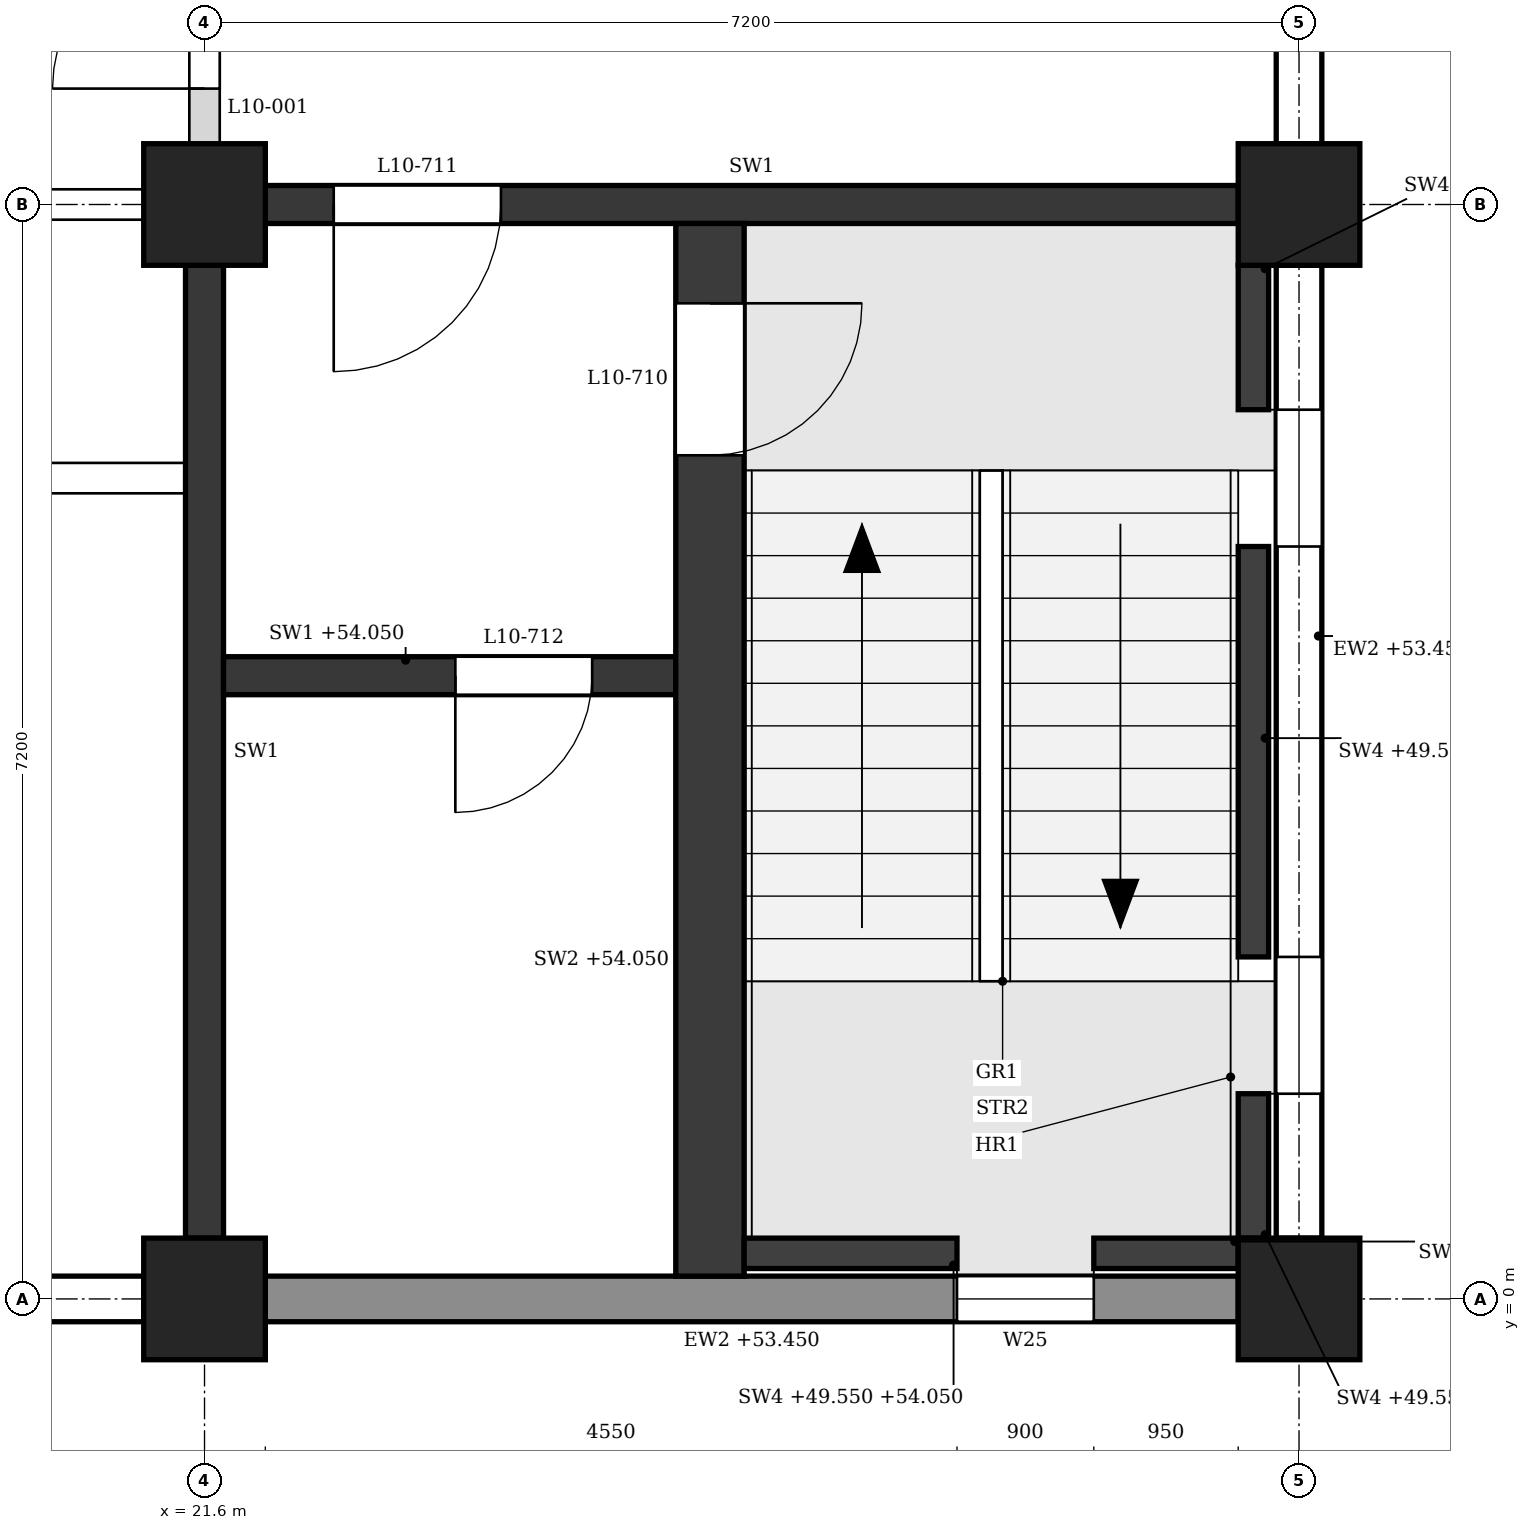
"""IFC4 building model, lengths in metres.
Left out: names, types, materials, properties, quantities, classifications, styles, units other than length and angle.
Written with IfcOpenShell. Run it as: python <this file> out.ifc"""

import sys

from ifc_helpers import new_model, si_unit, direction, frame, frame_2d, origin, origin_2d, place, context, subcontext, project, spatial, polyline, rectangle, outline, extrude, element, fill, save


model = new_model("IFC4")
c1 = context("Model", 3, precision=1e-05, world=origin(), true_north=direction((0.0, 1.0)))
c2 = subcontext(c1, "Body", "Model", "MODEL_VIEW")
j1 = project(units=[si_unit("LENGTHUNIT", "METRE"), si_unit("PLANEANGLEUNIT", "RADIAN")], contexts=[c1])
p1 = place(None, origin())
s1 = spatial("IfcSite", under=j1, at=p1, CompositionType="ELEMENT")
p2 = place(p1, origin())
s2 = spatial("IfcBuilding", under=s1, at=p2, CompositionType="ELEMENT")
p3 = place(p2, frame((0.0, 0.0, 49.8)))
s3 = spatial("IfcBuildingStorey", under=s2, at=p3, CompositionType="ELEMENT", Elevation=49.8)
for number, where, z_axis, x_axis in (
    (1, (21.6, 0.0, 0.0), (0.0, 0.0, 1.0), (1.0, 0.0, 0.0)),
    (2, (21.6, 7.2, 0.0), (0.0, 0.0, 1.0), (1.0, 0.0, 0.0)),
    (3, (28.8, 0.0, 0.0), (0.0, 0.0, 1.0), (1.0, 0.0, 0.0)),
    (4, (28.8, 7.2, 0.0), (0.0, 0.0, 1.0), (1.0, 0.0, 0.0)),
):
    element("IfcColumn", number, at=place(p3, frame(where, z_axis=z_axis, x_axis=x_axis)), inside=s3, PredefinedType="COLUMN", context=c2, shape_type="SweptSolid", body=[
        extrude(rectangle(XDim=0.8, YDim=0.8, at=origin_2d()), origin(), (0.0, 0.0, 1.0), 4.5),
    ])
p4 = place(p3, frame((14.8, 0.0, 0.0), z_axis=(0.0, 0.0, 1.0), x_axis=(1.0, 0.0, 0.0)))
e5 = element("IfcWall", 5, at=p4, inside=s3, PredefinedType="STANDARD", context=c2, shape_type="SweptSolid", body=[
    extrude(rectangle(XDim=6.4, YDim=0.3, at=frame_2d((3.2, 0.0))), origin(), (0.0, 0.0, 1.0), 3.65),
])
p5 = place(p4, frame((0.65, 0.0, 0.9)))
e6 = element("IfcOpeningElement", 6, at=p5, cuts=e5, PredefinedType="OPENING", context=c2, shape_type="SweptSolid", body=[
    extrude(outline(polyline([(0.0, 0.0), (1.5, 0.0), (1.5, 1.85), (0.75, 2.6), (0.0, 1.85), (0.0, 0.0)])), frame((0.0, 0.16, 0.0), z_axis=(0.0, -1.0, 0.0), x_axis=(1.0, 0.0, 0.0)), (0.0, 0.0, 1.0), 0.32),
])
p6 = place(p4, frame((4.25, 0.0, 0.9)))
e7 = element("IfcOpeningElement", 7, at=p6, cuts=e5, PredefinedType="OPENING", context=c2, shape_type="SweptSolid", body=[
    extrude(outline(polyline([(0.0, 0.0), (1.5, 0.0), (1.5, 1.85), (0.75, 2.6), (0.0, 1.85), (0.0, 0.0)])), frame((0.0, 0.16, 0.0), z_axis=(0.0, -1.0, 0.0), x_axis=(1.0, 0.0, 0.0)), (0.0, 0.0, 1.0), 0.32),
])
p7 = place(p3, frame((22.0, 0.0, 0.0), z_axis=(0.0, 0.0, 1.0), x_axis=(1.0, 0.0, 0.0)))
e8 = element("IfcWall", 8, at=p7, inside=s3, PredefinedType="STANDARD", context=c2, shape_type="SweptSolid", body=[
    extrude(rectangle(XDim=6.4, YDim=0.3, at=frame_2d((3.2, 0.0))), origin(), (0.0, 0.0, 1.0), 3.65),
])
p8 = place(p7, frame((4.55, 0.0, 0.9)))
e9 = element("IfcOpeningElement", 9, at=p8, cuts=e8, PredefinedType="OPENING", context=c2, shape_type="SweptSolid", body=[
    extrude(outline(polyline([(0.0, 0.0), (0.9, 0.0), (0.9, 2.15), (0.45, 2.6), (0.0, 2.15), (0.0, 0.0)])), frame((0.0, 0.16, 0.0), z_axis=(0.0, -1.0, 0.0), x_axis=(1.0, 0.0, 0.0)), (0.0, 0.0, 1.0), 0.32),
])
p9 = place(p3, frame((28.8, 0.4, 0.0), z_axis=(0.0, 0.0, 1.0), x_axis=(0.0, 1.0, 0.0)))
e10 = element("IfcWall", 10, at=p9, inside=s3, PredefinedType="STANDARD", context=c2, shape_type="SweptSolid", body=[
    extrude(rectangle(XDim=6.4, YDim=0.3, at=frame_2d((3.2, 0.0))), origin(), (0.0, 0.0, 1.0), 3.65),
])
p10 = place(p9, frame((0.95, 0.0, 0.9)))
e11 = element("IfcOpeningElement", 11, at=p10, cuts=e10, PredefinedType="OPENING", context=c2, shape_type="SweptSolid", body=[
    extrude(outline(polyline([(0.0, 0.0), (0.9, 0.0), (0.9, 2.15), (0.45, 2.6), (0.0, 2.15), (0.0, 0.0)])), frame((0.0, 0.16, 0.0), z_axis=(0.0, -1.0, 0.0), x_axis=(1.0, 0.0, 0.0)), (0.0, 0.0, 1.0), 0.32),
])
p11 = place(p9, frame((4.55, 0.0, 0.9)))
e12 = element("IfcOpeningElement", 12, at=p11, cuts=e10, PredefinedType="OPENING", context=c2, shape_type="SweptSolid", body=[
    extrude(outline(polyline([(0.0, 0.0), (0.9, 0.0), (0.9, 2.15), (0.45, 2.6), (0.0, 2.15), (0.0, 0.0)])), frame((0.0, 0.16, 0.0), z_axis=(0.0, -1.0, 0.0), x_axis=(1.0, 0.0, 0.0)), (0.0, 0.0, 1.0), 0.32),
])
p12 = place(p3, frame((28.8, 7.6, 0.0), z_axis=(0.0, 0.0, 1.0), x_axis=(0.0, 1.0, 0.0)))
e13 = element("IfcWall", 13, at=p12, inside=s3, PredefinedType="STANDARD", context=c2, shape_type="SweptSolid", body=[
    extrude(rectangle(XDim=6.4, YDim=0.3, at=frame_2d((3.2, 0.0))), origin(), (0.0, 0.0, 1.0), 3.65),
])
p13 = place(p12, frame((0.65, 0.0, 0.9)))
e14 = element("IfcOpeningElement", 14, at=p13, cuts=e13, PredefinedType="OPENING", context=c2, shape_type="SweptSolid", body=[
    extrude(outline(polyline([(0.0, 0.0), (1.5, 0.0), (1.5, 1.85), (0.75, 2.6), (0.0, 1.85), (0.0, 0.0)])), frame((0.0, 0.16, 0.0), z_axis=(0.0, -1.0, 0.0), x_axis=(1.0, 0.0, 0.0)), (0.0, 0.0, 1.0), 0.32),
])
p14 = place(p3, frame((22.0, 7.2, 0.0), z_axis=(0.0, 0.0, 1.0), x_axis=(1.0, 0.0, 0.0)))
e15 = element("IfcWall", 15, at=p14, inside=s3, PredefinedType="SHEAR", context=c2, shape_type="SweptSolid", body=[
    extrude(rectangle(XDim=6.4, YDim=0.25, at=frame_2d((3.2, 0.0))), origin(), (0.0, 0.0, 1.0), 3.55),
])
p15 = place(p14, frame((0.45, 0.0, 0.0)))
e16 = element("IfcOpeningElement", 16, at=p15, cuts=e15, PredefinedType="OPENING", context=c2, shape_type="SweptSolid", body=[
    extrude(rectangle(XDim=1.1, YDim=2.1, at=frame_2d((0.55, 1.05))), frame((0.0, 0.135, 0.0), z_axis=(0.0, -1.0, 0.0), x_axis=(1.0, 0.0, 0.0)), (0.0, 0.0, 1.0), 0.27),
])
p16 = place(p3, frame((21.6, 0.4, 0.0), z_axis=(0.0, 0.0, 1.0), x_axis=(0.0, 1.0, 0.0)))
e17 = element("IfcWall", 17, at=p16, inside=s3, PredefinedType="SHEAR", context=c2, shape_type="SweptSolid", body=[
    extrude(rectangle(XDim=6.4, YDim=0.25, at=frame_2d((3.2, 0.0))), origin(), (0.0, 0.0, 1.0), 3.55),
])
p17 = place(p3, frame((28.5, 0.4, -0.25), z_axis=(0.0, 0.0, 1.0), x_axis=(0.0, 1.0, 0.0)))
e18 = element("IfcWall", 18, at=p17, inside=s3, PredefinedType="SHEAR", context=c2, shape_type="SweptSolid", body=[
    extrude(rectangle(XDim=0.95, YDim=0.2, at=frame_2d((0.475, 0.0))), origin(), (0.0, 0.0, 1.0), 4.5),
])
p18 = place(p3, frame((28.5, 2.25, -0.25), z_axis=(0.0, 0.0, 1.0), x_axis=(0.0, 1.0, 0.0)))
e19 = element("IfcWall", 19, at=p18, inside=s3, PredefinedType="SHEAR", context=c2, shape_type="SweptSolid", body=[
    extrude(rectangle(XDim=2.7, YDim=0.2, at=frame_2d((1.35, 0.0))), origin(), (0.0, 0.0, 1.0), 4.5),
])
p19 = place(p3, frame((28.5, 5.85, -0.25), z_axis=(0.0, 0.0, 1.0), x_axis=(0.0, 1.0, 0.0)))
e20 = element("IfcWall", 20, at=p19, inside=s3, PredefinedType="SHEAR", context=c2, shape_type="SweptSolid", body=[
    extrude(rectangle(XDim=0.95, YDim=0.2, at=frame_2d((0.475, 0.0))), origin(), (0.0, 0.0, 1.0), 4.5),
])
p20 = place(p3, frame((25.15, 0.3, -0.25), z_axis=(0.0, 0.0, 1.0), x_axis=(1.0, 0.0, 0.0)))
e21 = element("IfcWall", 21, at=p20, inside=s3, PredefinedType="SHEAR", context=c2, shape_type="SweptSolid", body=[
    extrude(rectangle(XDim=1.4, YDim=0.2, at=frame_2d((0.7, 0.0))), origin(), (0.0, 0.0, 1.0), 4.5),
])
p21 = place(p3, frame((27.45, 0.3, -0.25), z_axis=(0.0, 0.0, 1.0), x_axis=(1.0, 0.0, 0.0)))
e22 = element("IfcWall", 22, at=p21, inside=s3, PredefinedType="SHEAR", context=c2, shape_type="SweptSolid", body=[
    extrude(rectangle(XDim=0.95, YDim=0.2, at=frame_2d((0.475, 0.0))), origin(), (0.0, 0.0, 1.0), 4.5),
])
p22 = place(p3, frame((24.925, 0.15, 0.0), z_axis=(0.0, 0.0, 1.0), x_axis=(0.0, 1.0, 0.0)))
e23 = element("IfcWall", 23, at=p22, inside=s3, PredefinedType="SHEAR", context=c2, shape_type="SweptSolid", body=[
    extrude(rectangle(XDim=6.925, YDim=0.45, at=frame_2d((3.462, 0.0))), origin(), (0.0, 0.0, 1.0), 4.25),
])
p23 = place(p22, frame((5.4, 0.0, 0.0)))
e24 = element("IfcOpeningElement", 24, at=p23, cuts=e23, PredefinedType="OPENING", context=c2, shape_type="SweptSolid", body=[
    extrude(rectangle(XDim=1.0, YDim=2.1, at=frame_2d((0.5, 1.05))), frame((0.0, 0.235, 0.0), z_axis=(0.0, -1.0, 0.0), x_axis=(1.0, 0.0, 0.0)), (0.0, 0.0, 1.0), 0.47),
])
p24 = place(p3, frame((21.725, 4.1, 0.0), z_axis=(0.0, 0.0, 1.0), x_axis=(1.0, 0.0, 0.0)))
e25 = element("IfcWall", 25, at=p24, inside=s3, PredefinedType="SHEAR", context=c2, shape_type="SweptSolid", body=[
    extrude(rectangle(XDim=2.975, YDim=0.25, at=frame_2d((1.487, 0.0))), origin(), (0.0, 0.0, 1.0), 4.25),
])
p25 = place(p24, frame((1.525, 0.0, 0.0)))
e26 = element("IfcOpeningElement", 26, at=p25, cuts=e25, PredefinedType="OPENING", context=c2, shape_type="SweptSolid", body=[
    extrude(rectangle(XDim=0.9, YDim=2.1, at=frame_2d((0.45, 1.05))), frame((0.0, 0.135, 0.0), z_axis=(0.0, -1.0, 0.0), x_axis=(1.0, 0.0, 0.0)), (0.0, 0.0, 1.0), 0.27),
])
p26 = place(p3, frame((7.325, 5.4, 0.0), z_axis=(0.0, 0.0, 1.0), x_axis=(1.0, 0.0, 0.0)))
e27 = element("IfcWall", 27, at=p26, inside=s3, PredefinedType="PARTITIONING", context=c2, shape_type="SweptSolid", body=[
    extrude(outline(polyline([(0.0, 0.0), (14.15, 0.0), (14.15, 3.55), (14.05, 3.55), (14.05, 4.25), (7.3, 4.25), (7.3, 3.55), (6.85, 3.55), (6.85, 4.25), (0.1, 4.25), (0.1, 3.55), (0.0, 3.55), (0.0, 0.0)])), frame((0.0, 0.1, 0.0), z_axis=(0.0, -1.0, 0.0), x_axis=(1.0, 0.0, 0.0)), (0.0, 0.0, 1.0), 0.2),
])
p27 = place(p26, frame((1.238, 0.0, 0.0)))
e28 = element("IfcOpeningElement", 28, at=p27, cuts=e27, PredefinedType="OPENING", context=c2, shape_type="SweptSolid", body=[
    extrude(rectangle(XDim=1.0, YDim=2.1, at=frame_2d((0.5, 1.05))), frame((0.0, 0.11, 0.0), z_axis=(0.0, -1.0, 0.0), x_axis=(1.0, 0.0, 0.0)), (0.0, 0.0, 1.0), 0.22),
])
p28 = place(p26, frame((4.775, 0.0, 0.0)))
e29 = element("IfcOpeningElement", 29, at=p28, cuts=e27, PredefinedType="OPENING", context=c2, shape_type="SweptSolid", body=[
    extrude(rectangle(XDim=1.0, YDim=2.1, at=frame_2d((0.5, 1.05))), frame((0.0, 0.11, 0.0), z_axis=(0.0, -1.0, 0.0), x_axis=(1.0, 0.0, 0.0)), (0.0, 0.0, 1.0), 0.22),
])
p29 = place(p26, frame((8.375, 0.0, 0.0)))
e30 = element("IfcOpeningElement", 30, at=p29, cuts=e27, PredefinedType="OPENING", context=c2, shape_type="SweptSolid", body=[
    extrude(rectangle(XDim=1.0, YDim=2.1, at=frame_2d((0.5, 1.05))), frame((0.0, 0.11, 0.0), z_axis=(0.0, -1.0, 0.0), x_axis=(1.0, 0.0, 0.0)), (0.0, 0.0, 1.0), 0.22),
])
p30 = place(p26, frame((11.913, 0.0, 0.0)))
e31 = element("IfcOpeningElement", 31, at=p30, cuts=e27, PredefinedType="OPENING", context=c2, shape_type="SweptSolid", body=[
    extrude(rectangle(XDim=1.0, YDim=2.1, at=frame_2d((0.5, 1.05))), frame((0.0, 0.11, 0.0), z_axis=(0.0, -1.0, 0.0), x_axis=(1.0, 0.0, 0.0)), (0.0, 0.0, 1.0), 0.22),
])
p31 = place(p3, frame((14.8, 7.2, 0.0), z_axis=(0.0, 0.0, 1.0), x_axis=(1.0, 0.0, 0.0)))
e32 = element("IfcWall", 32, at=p31, inside=s3, PredefinedType="PARTITIONING", context=c2, shape_type="SweptSolid", body=[
    extrude(rectangle(XDim=6.4, YDim=0.2, at=frame_2d((3.2, 0.0))), origin(), (0.0, 0.0, 1.0), 3.55),
])
p32 = place(p31, frame((4.3, 0.0, 0.0)))
e33 = element("IfcOpeningElement", 33, at=p32, cuts=e32, PredefinedType="OPENING", context=c2, shape_type="SweptSolid", body=[
    extrude(rectangle(XDim=1.0, YDim=2.1, at=frame_2d((0.5, 1.05))), frame((0.0, 0.11, 0.0), z_axis=(0.0, -1.0, 0.0), x_axis=(1.0, 0.0, 0.0)), (0.0, 0.0, 1.0), 0.22),
])
p33 = place(p3, frame((21.6, 7.6, 0.0), z_axis=(0.0, 0.0, 1.0), x_axis=(0.0, 1.0, 0.0)))
e34 = element("IfcWall", 34, at=p33, inside=s3, PredefinedType="PARTITIONING", context=c2, shape_type="SweptSolid", body=[
    extrude(rectangle(XDim=2.725, YDim=0.2, at=frame_2d((1.362, 0.0))), origin(), (0.0, 0.0, 1.0), 3.55),
])
p34 = place(p33, frame((0.362, 0.0, 0.0)))
e35 = element("IfcOpeningElement", 35, at=p34, cuts=e34, PredefinedType="OPENING", context=c2, shape_type="SweptSolid", body=[
    extrude(rectangle(XDim=2.0, YDim=2.4, at=frame_2d((1.0, 1.2))), frame((0.0, 0.11, 0.0), z_axis=(0.0, -1.0, 0.0), x_axis=(1.0, 0.0, 0.0)), (0.0, 0.0, 1.0), 0.22),
])
p35 = place(p10, origin())
e36 = element("IfcWindow", 36, at=p35, inside=s3, PartitioningType="SINGLE_PANEL", PredefinedType="WINDOW", context=c2, shape_type="SweptSolid", body=[
    extrude(outline(polyline([(0.0, 0.0), (0.9, 0.0), (0.9, 2.15), (0.45, 2.6), (0.0, 2.15), (0.0, 0.0)])), frame((0.0, 0.03, 0.0), z_axis=(0.0, -1.0, 0.0), x_axis=(1.0, 0.0, 0.0)), (0.0, 0.0, 1.0), 0.06),
])
fill(e11, e36)
p36 = place(p11, origin())
e37 = element("IfcWindow", 37, at=p36, inside=s3, PartitioningType="SINGLE_PANEL", PredefinedType="WINDOW", context=c2, shape_type="SweptSolid", body=[
    extrude(outline(polyline([(0.0, 0.0), (0.9, 0.0), (0.9, 2.15), (0.45, 2.6), (0.0, 2.15), (0.0, 0.0)])), frame((0.0, 0.03, 0.0), z_axis=(0.0, -1.0, 0.0), x_axis=(1.0, 0.0, 0.0)), (0.0, 0.0, 1.0), 0.06),
])
fill(e12, e37)
p37 = place(p8, origin())
e38 = element("IfcWindow", 38, at=p37, inside=s3, PartitioningType="SINGLE_PANEL", PredefinedType="WINDOW", context=c2, shape_type="SweptSolid", body=[
    extrude(outline(polyline([(0.0, 0.0), (0.9, 0.0), (0.9, 2.15), (0.45, 2.6), (0.0, 2.15), (0.0, 0.0)])), frame((0.0, 0.03, 0.0), z_axis=(0.0, -1.0, 0.0), x_axis=(1.0, 0.0, 0.0)), (0.0, 0.0, 1.0), 0.06),
])
fill(e9, e38)
p38 = place(p23, frame((1.0, 0.0, 0.0), z_axis=(0.0, 0.0, 1.0), x_axis=(-1.0, 0.0, 0.0)))
e39 = element("IfcDoor", 39, at=p38, inside=s3, OperationType="SINGLE_SWING_LEFT", PredefinedType="DOOR", context=c2, shape_type="SweptSolid", body=[
    extrude(rectangle(XDim=1.0, YDim=2.1, at=frame_2d((0.5, 1.05))), frame((0.0, 0.025, 0.0), z_axis=(0.0, -1.0, 0.0), x_axis=(1.0, 0.0, 0.0)), (0.0, 0.0, 1.0), 0.05),
])
fill(e24, e39)
p39 = place(p15, frame((1.1, 0.0, 0.0), z_axis=(0.0, 0.0, 1.0), x_axis=(-1.0, 0.0, 0.0)))
e40 = element("IfcDoor", 40, at=p39, inside=s3, OperationType="SINGLE_SWING_RIGHT", PredefinedType="DOOR", context=c2, shape_type="SweptSolid", body=[
    extrude(rectangle(XDim=1.1, YDim=2.1, at=frame_2d((0.55, 1.05))), frame((0.0, 0.025, 0.0), z_axis=(0.0, -1.0, 0.0), x_axis=(1.0, 0.0, 0.0)), (0.0, 0.0, 1.0), 0.05),
])
fill(e16, e40)
p40 = place(p25, frame((0.9, 0.0, 0.0), z_axis=(0.0, 0.0, 1.0), x_axis=(-1.0, 0.0, 0.0)))
e41 = element("IfcDoor", 41, at=p40, inside=s3, OperationType="SINGLE_SWING_RIGHT", PredefinedType="DOOR", context=c2, shape_type="SweptSolid", body=[
    extrude(rectangle(XDim=0.9, YDim=2.1, at=frame_2d((0.45, 1.05))), frame((0.0, 0.025, 0.0), z_axis=(0.0, -1.0, 0.0), x_axis=(1.0, 0.0, 0.0)), (0.0, 0.0, 1.0), 0.05),
])
fill(e26, e41)
p41 = place(p34, origin())
e42 = element("IfcDoor", 42, at=p41, inside=s3, OperationType="DOUBLE_DOOR_SINGLE_SWING", PredefinedType="DOOR", context=c2, shape_type="SweptSolid", body=[
    extrude(rectangle(XDim=2.0, YDim=2.4, at=frame_2d((1.0, 1.2))), frame((0.0, 0.025, 0.0), z_axis=(0.0, -1.0, 0.0), x_axis=(1.0, 0.0, 0.0)), (0.0, 0.0, 1.0), 0.05),
])
fill(e35, e42)
save(model, sys.argv[1])
